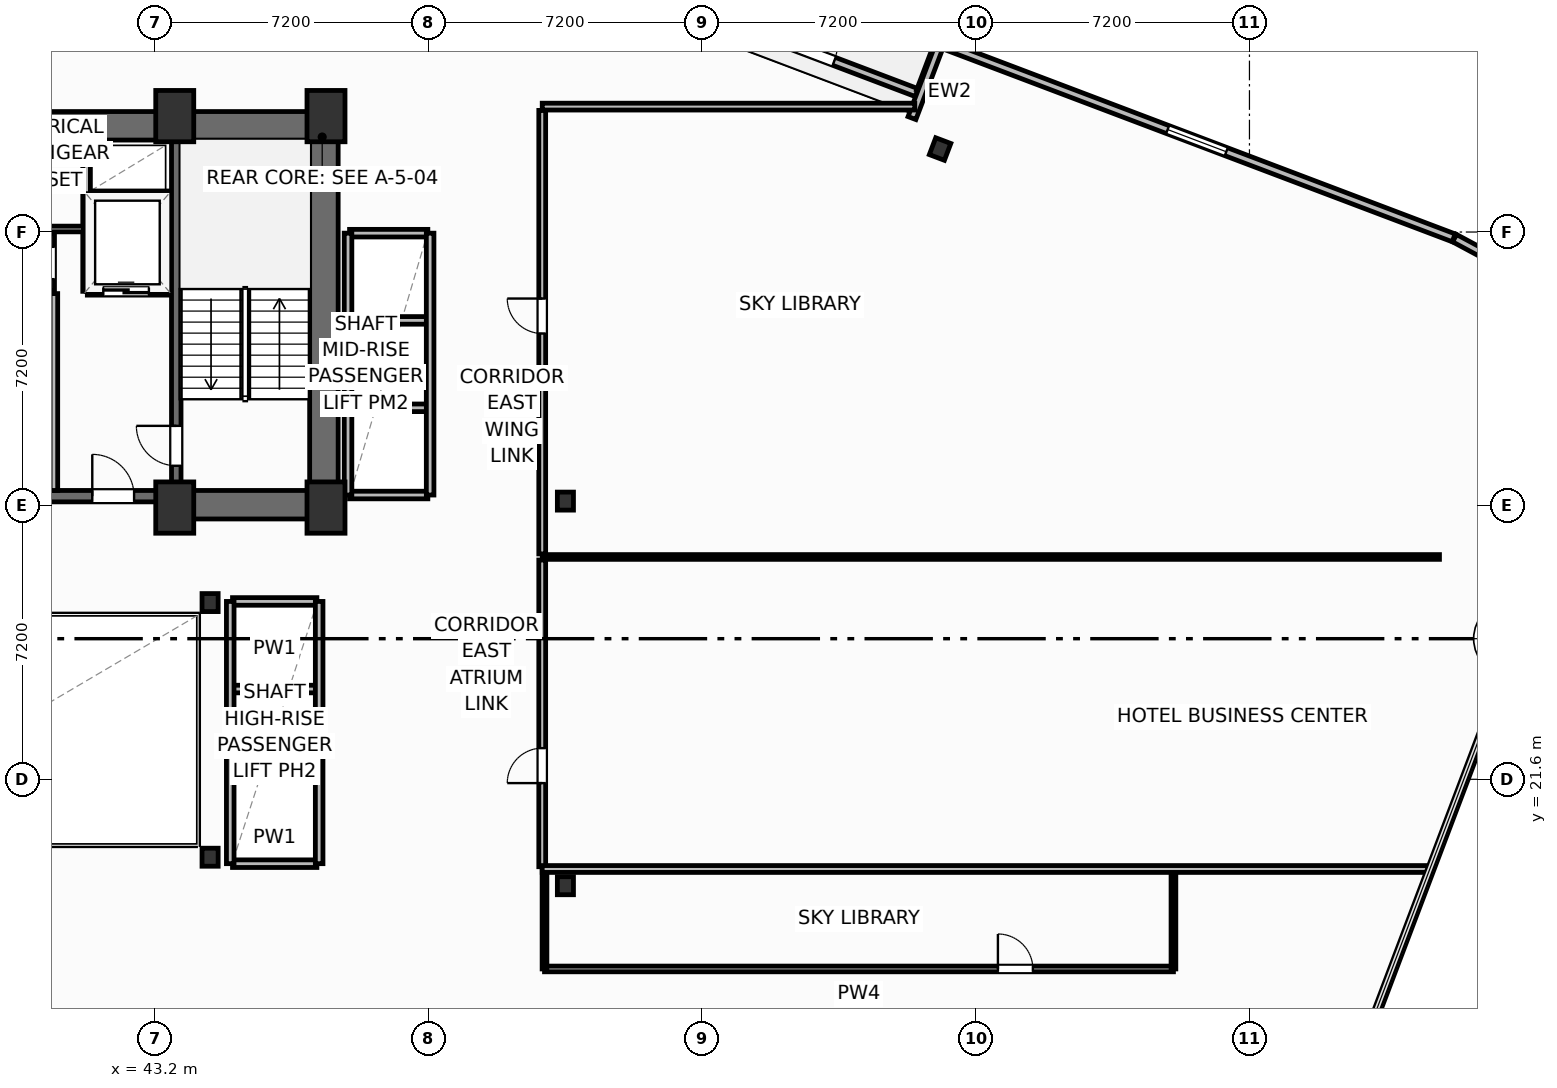
"""IFC4 building model, lengths in metres.
Left out: names, types, materials, properties, quantities, classifications, styles, units other than length and angle.
Written with IfcOpenShell. Run it as: python <this file> out.ifc"""

import sys

from ifc_helpers import new_model, si_unit, direction, frame, frame_2d, origin, origin_2d, place, context, subcontext, project, spatial, rectangle, i_section, extrude, element, fill, save


model = new_model("IFC4")
c1 = context("Model", 3, precision=1e-05, world=origin(), true_north=direction((0.0, 1.0)))
c2 = subcontext(c1, "Body", "Model", "MODEL_VIEW")
j1 = project(units=[si_unit("LENGTHUNIT", "METRE"), si_unit("PLANEANGLEUNIT", "RADIAN")], contexts=[c1])
p1 = place(None, origin())
s1 = spatial("IfcSite", under=j1, at=p1, CompositionType="ELEMENT")
p2 = place(p1, origin())
s2 = spatial("IfcBuilding", under=s1, at=p2, CompositionType="ELEMENT")
p3 = place(p2, frame((0.0, 0.0, 113.2)))
s3 = spatial("IfcBuildingStorey", under=s2, at=p3, CompositionType="ELEMENT", Elevation=113.2)
for number, where, z_axis, x_axis in (
    (1, (43.72, 28.75, 0.0), (0.0, 0.0, 1.0), (1.0, 0.0, 0.0)),
    (2, (47.7, 28.75, 0.0), (0.0, 0.0, 1.0), (1.0, 0.0, 0.0)),
    (3, (43.72, 39.05, 0.0), (0.0, 0.0, 1.0), (1.0, 0.0, 0.0)),
    (4, (47.7, 39.05, 0.0), (0.0, 0.0, 1.0), (1.0, 0.0, 0.0)),
):
    element("IfcColumn", number, at=place(p3, frame(where, z_axis=z_axis, x_axis=x_axis)), inside=s3, PredefinedType="COLUMN", context=c2, shape_type="SweptSolid", body=[
        extrude(rectangle(XDim=1.0, YDim=1.35, at=origin_2d()), origin(), (0.0, 0.0, 1.0), 3.7),
    ])
for number, where, z_axis, x_axis in (
    (5, (44.65, 19.55, 0.0), (0.0, 0.0, 1.0), (1.0, 0.0, 0.0)),
    (6, (44.65, 26.25, 0.0), (0.0, 0.0, 1.0), (1.0, 0.0, 0.0)),
    (7, (54.0, 18.8, 0.0), (0.0, 0.0, 1.0), (1.0, 0.0, 0.0)),
    (8, (54.0, 28.92, 0.0), (0.0, 0.0, 1.0), (1.0, 0.0, 0.0)),
):
    element("IfcColumn", number, at=place(p3, frame(where, z_axis=z_axis, x_axis=x_axis)), inside=s3, PredefinedType="COLUMN", context=c2, shape_type="SweptSolid", body=[
        extrude(i_section(OverallWidth=0.424, OverallDepth=0.474, WebThickness=0.048, FlangeThickness=0.077, FilletRadius=0.025, at=origin_2d()), origin(), (0.0, 0.0, 1.0), 3.7),
    ])
p4 = place(p3, frame((30.38, 38.795, 0.0), z_axis=(0.0, 0.0, 1.0), x_axis=(1.0, 0.0, 0.0)))
e9 = element("IfcWall", 9, at=p4, inside=s3, PredefinedType="SHEAR", context=c2, shape_type="SweptSolid", body=[
    extrude(rectangle(XDim=17.64, YDim=0.75, at=frame_2d((8.82, 0.0))), origin(), (0.0, 0.0, 1.0), 3.38),
])
p5 = place(p3, frame((47.645, 29.2, 0.0), z_axis=(0.0, 0.0, 1.0), x_axis=(0.0, 1.0, 0.0)))
e10 = element("IfcWall", 10, at=p5, inside=s3, PredefinedType="SHEAR", context=c2, shape_type="SweptSolid", body=[
    extrude(rectangle(XDim=9.22, YDim=0.75, at=frame_2d((4.61, 0.0))), origin(), (0.0, 0.0, 1.0), 3.38),
])
p6 = place(p3, frame((43.6, 28.825, 0.0), z_axis=(0.0, 0.0, 1.0), x_axis=(1.0, 0.0, 0.0)))
e11 = element("IfcWall", 11, at=p6, inside=s3, PredefinedType="SHEAR", context=c2, shape_type="SweptSolid", body=[
    extrude(rectangle(XDim=4.42, YDim=0.75, at=frame_2d((2.21, 0.0))), origin(), (0.0, 0.0, 1.0), 3.38),
])
p7 = place(p3, frame((34.8, 29.05, 0.0), z_axis=(0.0, 0.0, 1.0), x_axis=(1.0, 0.0, 0.0)))
e12 = element("IfcWall", 12, at=p7, inside=s3, PredefinedType="SHEAR", context=c2, shape_type="SweptSolid", body=[
    extrude(rectangle(XDim=8.8, YDim=0.3, at=frame_2d((4.4, 0.0))), origin(), (0.0, 0.0, 1.0), 3.38),
])
p8 = place(p7, frame((0.95, 0.0, 0.0)))
e13 = element("IfcOpeningElement", 13, at=p8, cuts=e12, PredefinedType="OPENING", context=c2, shape_type="SweptSolid", body=[
    extrude(rectangle(XDim=1.1, YDim=2.15, at=frame_2d((0.55, 1.075))), frame((0.0, 0.16, 0.0), z_axis=(0.0, -1.0, 0.0), x_axis=(1.0, 0.0, 0.0)), (0.0, 0.0, 1.0), 0.32),
])
p9 = place(p7, frame((6.75, 0.0, 0.0)))
e14 = element("IfcOpeningElement", 14, at=p9, cuts=e12, PredefinedType="OPENING", context=c2, shape_type="SweptSolid", body=[
    extrude(rectangle(XDim=1.1, YDim=2.15, at=frame_2d((0.55, 1.075))), frame((0.0, 0.16, 0.0), z_axis=(0.0, -1.0, 0.0), x_axis=(1.0, 0.0, 0.0)), (0.0, 0.0, 1.0), 0.32),
])
p10 = place(p7, frame((4.45, 0.0, 0.0)))
e15 = element("IfcOpeningElement", 15, at=p10, cuts=e12, PredefinedType="OPENING", context=c2, shape_type="SweptSolid", body=[
    extrude(rectangle(XDim=0.95, YDim=2.15, at=frame_2d((0.475, 1.075))), frame((0.0, 0.16, 0.0), z_axis=(0.0, -1.0, 0.0), x_axis=(1.0, 0.0, 0.0)), (0.0, 0.0, 1.0), 0.32),
])
p11 = place(p3, frame((43.76, 29.2, 0.0), z_axis=(0.0, 0.0, 1.0), x_axis=(0.0, 1.0, 0.0)))
e16 = element("IfcWall", 16, at=p11, inside=s3, PredefinedType="SHEAR", context=c2, shape_type="SweptSolid", body=[
    extrude(rectangle(XDim=9.22, YDim=0.25, at=frame_2d((4.61, 0.0))), origin(), (0.0, 0.0, 1.0), 3.38),
])
p12 = place(p11, frame((0.65, 0.0, 0.0)))
e17 = element("IfcOpeningElement", 17, at=p12, cuts=e16, PredefinedType="OPENING", context=c2, shape_type="SweptSolid", body=[
    extrude(rectangle(XDim=1.05, YDim=2.15, at=frame_2d((0.525, 1.075))), frame((0.0, 0.135, 0.0), z_axis=(0.0, -1.0, 0.0), x_axis=(1.0, 0.0, 0.0)), (0.0, 0.0, 1.0), 0.27),
])
p13 = place(p3, frame((63.859, 38.184, 0.0), z_axis=(0.0, 0.0, 1.0), x_axis=(0.935221751401, -0.354062530786, 0.0)))
e18 = element("IfcColumn", 18, at=p13, inside=s3, PredefinedType="COLUMN", context=c2, shape_type="SweptSolid", body=[
    extrude(i_section(OverallWidth=0.424, OverallDepth=0.474, WebThickness=0.048, FlangeThickness=0.077, FilletRadius=0.025, at=origin_2d()), origin(), (0.0, 0.0, 1.0), 3.7),
])
p14 = place(p3, frame((57.633, 41.792, 0.0), z_axis=(0.0, 0.0, 1.0), x_axis=(0.935222539288, -0.354060449652, 0.0)))
e19 = element("IfcWall", 19, at=p14, inside=s3, PredefinedType="SOLIDWALL", context=c2, shape_type="SweptSolid", body=[
    extrude(rectangle(XDim=6.0, YDim=0.22, at=frame_2d((3.0, 0.0))), origin(), (0.0, 0.0, 1.0), 2.66),
])
p15 = place(p14, frame((2.176, 0.0, 0.0)))
e20 = element("IfcOpeningElement", 20, at=p15, cuts=e19, PredefinedType="OPENING", context=c2, shape_type="SweptSolid", body=[
    extrude(rectangle(XDim=1.5, YDim=2.25, at=frame_2d((0.75, 1.125))), frame((0.0, 0.12, 0.0), z_axis=(0.0, -1.0, 0.0), x_axis=(1.0, 0.0, 0.0)), (0.0, 0.0, 1.0), 0.24),
])
p16 = place(p3, frame((78.597, 35.194, 0.0), z_axis=(0.0, 0.0, 1.0), x_axis=(-0.880948732004, 0.473211719614, 0.0)))
e21 = element("IfcWall", 21, at=p16, inside=s3, PredefinedType="SOLIDWALL", context=c2, shape_type="SweptSolid", body=[
    extrude(rectangle(XDim=1.361, YDim=0.22, at=frame_2d((0.681, 0.0))), origin(), (0.0, 0.0, 1.0), 2.66),
])
p17 = place(p3, frame((77.375, 35.847, 0.0), z_axis=(0.0, 0.0, 1.0), x_axis=(-0.935222448475, 0.354060689526, 0.0)))
e22 = element("IfcWall", 22, at=p17, inside=s3, PredefinedType="SOLIDWALL", context=c2, shape_type="SweptSolid", body=[
    extrude(rectangle(XDim=14.447, YDim=0.22, at=frame_2d((7.224, 0.0))), origin(), (0.0, 0.0, 1.0), 2.66),
])
p18 = place(p17, frame((6.399, 0.0, 0.8)))
e23 = element("IfcOpeningElement", 23, at=p18, cuts=e22, PredefinedType="OPENING", context=c2, shape_type="SweptSolid", body=[
    extrude(rectangle(XDim=1.65, YDim=1.65, at=frame_2d((0.825, 0.825))), frame((0.0, 0.12, 0.0), z_axis=(0.0, -1.0, 0.0), x_axis=(1.0, 0.0, 0.0)), (0.0, 0.0, 1.0), 0.24),
])
p19 = place(p3, frame((63.819, 40.845, 0.0), z_axis=(0.0, 0.0, 1.0), x_axis=(-0.354128791944, -0.935196663123, 0.0)))
e24 = element("IfcWall", 24, at=p19, inside=s3, PredefinedType="SOLIDWALL", context=c2, shape_type="SweptSolid", body=[
    extrude(rectangle(XDim=1.975, YDim=0.22, at=frame_2d((0.988, 0.0))), origin(), (0.0, 0.0, 1.0), 2.66),
])
p20 = place(p3, frame((53.45, 16.61, 0.0), z_axis=(0.0, 0.0, 1.0), x_axis=(1.0, 0.0, 0.0)))
e25 = element("IfcWall", 25, at=p20, inside=s3, PredefinedType="PARTITIONING", context=c2, shape_type="SweptSolid", body=[
    extrude(rectangle(XDim=16.55, YDim=0.15, at=frame_2d((8.275, 0.0))), origin(), (0.0, 0.0, 1.0), 3.38),
])
p21 = place(p20, frame((11.931, 0.0, 0.0)))
e26 = element("IfcOpeningElement", 26, at=p21, cuts=e25, PredefinedType="OPENING", context=c2, shape_type="SweptSolid", body=[
    extrude(rectangle(XDim=0.92, YDim=2.05, at=frame_2d((0.46, 1.025))), frame((0.0, 0.085, 0.0), z_axis=(0.0, -1.0, 0.0), x_axis=(1.0, 0.0, 0.0)), (0.0, 0.0, 1.0), 0.17),
])
p22 = place(p3, frame((53.45, 16.61, 0.0), z_axis=(0.0, 0.0, 1.0), x_axis=(0.0, 1.0, 0.0)))
e27 = element("IfcWall", 27, at=p22, inside=s3, PredefinedType="PARTITIONING", context=c2, shape_type="SweptSolid", body=[
    extrude(rectangle(XDim=2.63, YDim=0.125, at=frame_2d((1.315, 0.0))), origin(), (0.0, 0.0, 1.0), 1.165),
])
p23 = place(p3, frame((70.0, 16.61, 0.0), z_axis=(0.0, 0.0, 1.0), x_axis=(0.0, 1.0, 0.0)))
e28 = element("IfcWall", 28, at=p23, inside=s3, PredefinedType="PARTITIONING", context=c2, shape_type="SweptSolid", body=[
    extrude(rectangle(XDim=2.63, YDim=0.125, at=frame_2d((1.315, 0.0))), origin(), (0.0, 0.0, 1.0), 0.65),
])
p24 = place(p3, frame((53.39, 19.3, 0.0), z_axis=(0.0, 0.0, 1.0), x_axis=(0.0, 1.0, 0.0)))
e29 = element("IfcWall", 29, at=p24, inside=s3, PredefinedType="PARTITIONING", context=c2, shape_type="SweptSolid", body=[
    extrude(rectangle(XDim=8.07, YDim=0.18, at=frame_2d((4.035, 0.0))), origin(), (0.0, 0.0, 1.0), 3.38),
])
p25 = place(p24, frame((2.2, 0.0, 0.0)))
e30 = element("IfcOpeningElement", 30, at=p25, cuts=e29, PredefinedType="OPENING", context=c2, shape_type="SweptSolid", body=[
    extrude(rectangle(XDim=0.92, YDim=2.05, at=frame_2d((0.46, 1.025))), frame((0.0, 0.1, 0.0), z_axis=(0.0, -1.0, 0.0), x_axis=(1.0, 0.0, 0.0)), (0.0, 0.0, 1.0), 0.2),
])
p26 = place(p3, frame((53.39, 27.53, 0.0), z_axis=(0.0, 0.0, 1.0), x_axis=(0.0, 1.0, 0.0)))
e31 = element("IfcWall", 31, at=p26, inside=s3, PredefinedType="PARTITIONING", context=c2, shape_type="SweptSolid", body=[
    extrude(rectangle(XDim=11.67, YDim=0.18, at=frame_2d((5.835, 0.0))), origin(), (0.0, 0.0, 1.0), 3.38),
])
p27 = place(p26, frame((5.8, 0.0, 0.0)))
e32 = element("IfcOpeningElement", 32, at=p27, cuts=e31, PredefinedType="OPENING", context=c2, shape_type="SweptSolid", body=[
    extrude(rectangle(XDim=0.92, YDim=2.05, at=frame_2d((0.46, 1.025))), frame((0.0, 0.1, 0.0), z_axis=(0.0, -1.0, 0.0), x_axis=(1.0, 0.0, 0.0)), (0.0, 0.0, 1.0), 0.2),
])
p28 = place(p3, frame((53.39, 27.45, 0.0), z_axis=(0.0, 0.0, 1.0), x_axis=(1.0, 0.0, 0.0)))
e33 = element("IfcWall", 33, at=p28, inside=s3, PredefinedType="PARTITIONING", context=c2, shape_type="SweptSolid", body=[
    extrude(rectangle(XDim=23.61, YDim=0.125, at=frame_2d((11.805, 0.0))), origin(), (0.0, 0.0, 1.0), 3.38),
])
p29 = place(p3, frame((53.39, 19.24, 0.0), z_axis=(0.0, 0.0, 1.0), x_axis=(1.0, 0.0, 0.0)))
e34 = element("IfcWall", 34, at=p29, inside=s3, PredefinedType="PARTITIONING", context=c2, shape_type="SweptSolid", body=[
    extrude(rectangle(XDim=23.317, YDim=0.18, at=frame_2d((11.658, 0.0))), origin(), (0.0, 0.0, 1.0), 1.165),
])
p30 = place(p3, frame((53.39, 39.3, 0.0), z_axis=(0.0, 0.0, 1.0), x_axis=(1.0, 0.0, 0.0)))
e35 = element("IfcWall", 35, at=p30, inside=s3, PredefinedType="PARTITIONING", context=c2, shape_type="SweptSolid", body=[
    extrude(rectangle(XDim=9.804, YDim=0.18, at=frame_2d((4.902, 0.0))), origin(), (0.0, 0.0, 1.0), 3.38),
])
p31 = place(p3, frame((40.54, 29.2, 0.0), z_axis=(0.0, 0.0, 1.0), x_axis=(0.0, 1.0, 0.0)))
e36 = element("IfcWall", 36, at=p31, inside=s3, PredefinedType="PARTITIONING", context=c2, shape_type="SweptSolid", body=[
    extrude(rectangle(XDim=5.18, YDim=0.2, at=frame_2d((2.59, 0.0))), origin(), (0.0, 0.0, 1.0), 3.38),
])
p32 = place(p3, frame((41.42, 34.44, 0.0), z_axis=(0.0, 0.0, 1.0), x_axis=(1.0, 0.0, 0.0)))
e37 = element("IfcWall", 37, at=p32, inside=s3, PredefinedType="PARTITIONING", context=c2, shape_type="SweptSolid", body=[
    extrude(rectangle(XDim=2.18, YDim=0.2, at=frame_2d((1.09, 0.0))), origin(), (0.0, 0.0, 1.0), 3.38),
])
p33 = place(p32, frame((0.42, 0.0, 0.0)))
e38 = element("IfcOpeningElement", 38, at=p33, cuts=e37, PredefinedType="OPENING", context=c2, shape_type="SweptSolid", body=[
    extrude(rectangle(XDim=1.2, YDim=2.2, at=frame_2d((0.6, 1.1))), frame((0.0, 0.11, 0.0), z_axis=(0.0, -1.0, 0.0), x_axis=(1.0, 0.0, 0.0)), (0.0, 0.0, 1.0), 0.22),
])
p34 = place(p3, frame((41.42, 36.98, 0.0), z_axis=(0.0, 0.0, 1.0), x_axis=(1.0, 0.0, 0.0)))
e39 = element("IfcWall", 39, at=p34, inside=s3, PredefinedType="PARTITIONING", context=c2, shape_type="SweptSolid", body=[
    extrude(rectangle(XDim=2.18, YDim=0.2, at=frame_2d((1.09, 0.0))), origin(), (0.0, 0.0, 1.0), 3.38),
])
p35 = place(p3, frame((41.4, 34.44, 0.0), z_axis=(0.0, 0.0, 1.0), x_axis=(0.0, 1.0, 0.0)))
e40 = element("IfcWall", 40, at=p35, inside=s3, PredefinedType="PARTITIONING", context=c2, shape_type="SweptSolid", body=[
    extrude(rectangle(XDim=3.9, YDim=0.2, at=frame_2d((1.95, 0.0))), origin(), (0.0, 0.0, 1.0), 3.38),
])
p36 = place(p3, frame((39.3, 36.08, 0.0), z_axis=(0.0, 0.0, 1.0), x_axis=(1.0, 0.0, 0.0)))
e41 = element("IfcWall", 41, at=p36, inside=s3, PredefinedType="PARTITIONING", context=c2, shape_type="SweptSolid", body=[
    extrude(rectangle(XDim=2.02, YDim=0.15, at=frame_2d((1.01, 0.0))), origin(), (0.0, 0.0, 1.0), 3.38),
])
p37 = place(p36, frame((0.18, 0.0, 0.0)))
e42 = element("IfcOpeningElement", 42, at=p37, cuts=e41, PredefinedType="OPENING", context=c2, shape_type="SweptSolid", body=[
    extrude(rectangle(XDim=0.85, YDim=2.05, at=frame_2d((0.425, 1.025))), frame((0.0, 0.085, 0.0), z_axis=(0.0, -1.0, 0.0), x_axis=(1.0, 0.0, 0.0)), (0.0, 0.0, 1.0), 0.17),
])
p38 = place(p3, frame((40.48, 34.44, 0.0), z_axis=(0.0, 0.0, 1.0), x_axis=(0.0, 1.0, 0.0)))
e43 = element("IfcWall", 43, at=p38, inside=s3, PredefinedType="PARTITIONING", context=c2, shape_type="SweptSolid", body=[
    extrude(rectangle(XDim=1.52, YDim=0.15, at=frame_2d((0.76, 0.0))), origin(), (0.0, 0.0, 1.0), 3.38),
])
p39 = place(p38, frame((0.32, 0.0, 0.0)))
e44 = element("IfcOpeningElement", 44, at=p39, cuts=e43, PredefinedType="OPENING", context=c2, shape_type="SweptSolid", body=[
    extrude(rectangle(XDim=0.85, YDim=2.05, at=frame_2d((0.425, 1.025))), frame((0.0, 0.085, 0.0), z_axis=(0.0, -1.0, 0.0), x_axis=(1.0, 0.0, 0.0)), (0.0, 0.0, 1.0), 0.17),
])
for number, where, z_axis, x_axis in (
    (45, (48.32, 31.375, 0.0), (0.0, 0.0, 1.0), (1.0, 0.0, 0.0)),
    (46, (48.32, 33.675, 0.0), (0.0, 0.0, 1.0), (1.0, 0.0, 0.0)),
):
    element("IfcWall", number, at=place(p3, frame(where, z_axis=z_axis, x_axis=x_axis)), inside=s3, PredefinedType="PARTITIONING", context=c2, shape_type="SweptSolid", body=[
        extrude(rectangle(XDim=2.06, YDim=0.2, at=frame_2d((1.03, 0.0))), origin(), (0.0, 0.0, 1.0), 3.38),
    ])
p40 = place(p3, frame((48.32, 29.08, 0.0), z_axis=(0.0, 0.0, 1.0), x_axis=(1.0, 0.0, 0.0)))
e47 = element("IfcWall", 47, at=p40, inside=s3, PredefinedType="PARTITIONING", context=c2, shape_type="SweptSolid", body=[
    extrude(rectangle(XDim=2.06, YDim=0.2, at=frame_2d((1.03, 0.0))), origin(), (0.0, 0.0, 1.0), 2.592),
])
p41 = place(p3, frame((48.32, 35.97, 0.0), z_axis=(0.0, 0.0, 1.0), x_axis=(1.0, 0.0, 0.0)))
e48 = element("IfcWall", 48, at=p41, inside=s3, PredefinedType="PARTITIONING", context=c2, shape_type="SweptSolid", body=[
    extrude(rectangle(XDim=2.06, YDim=0.2, at=frame_2d((1.03, 0.0))), origin(), (0.0, 0.0, 1.0), 3.38),
])
for number, where, z_axis, x_axis in (
    (49, (48.28, 29.08, 0.0), (0.0, 0.0, 1.0), (0.0, 1.0, 0.0)),
    (50, (50.44, 29.08, 0.0), (0.0, 0.0, 1.0), (0.0, 1.0, 0.0)),
):
    element("IfcWall", number, at=place(p3, frame(where, z_axis=z_axis, x_axis=x_axis)), inside=s3, PredefinedType="PARTITIONING", context=c2, shape_type="SweptSolid", body=[
        extrude(rectangle(XDim=6.89, YDim=0.2, at=frame_2d((3.445, 0.0))), origin(), (0.0, 0.0, 1.0), 3.38),
    ])
for number, where, z_axis, x_axis in (
    (51, (45.24, 21.675, 0.0), (0.0, 0.0, 1.0), (1.0, 0.0, 0.0)),
    (52, (45.24, 23.975, 0.0), (0.0, 0.0, 1.0), (1.0, 0.0, 0.0)),
):
    element("IfcWall", number, at=place(p3, frame(where, z_axis=z_axis, x_axis=x_axis)), inside=s3, PredefinedType="PARTITIONING", context=c2, shape_type="SweptSolid", body=[
        extrude(rectangle(XDim=2.22, YDim=0.2, at=frame_2d((1.11, 0.0))), origin(), (0.0, 0.0, 1.0), 3.38),
    ])
p42 = place(p3, frame((45.24, 19.38, 0.0), z_axis=(0.0, 0.0, 1.0), x_axis=(1.0, 0.0, 0.0)))
e53 = element("IfcWall", 53, at=p42, inside=s3, PredefinedType="PARTITIONING", context=c2, shape_type="SweptSolid", body=[
    extrude(rectangle(XDim=2.22, YDim=0.2, at=frame_2d((1.11, 0.0))), origin(), (0.0, 0.0, 1.0), 2.592),
])
p43 = place(p3, frame((45.24, 26.28, 0.0), z_axis=(0.0, 0.0, 1.0), x_axis=(1.0, 0.0, 0.0)))
e54 = element("IfcWall", 54, at=p43, inside=s3, PredefinedType="PARTITIONING", context=c2, shape_type="SweptSolid", body=[
    extrude(rectangle(XDim=2.22, YDim=0.2, at=frame_2d((1.11, 0.0))), origin(), (0.0, 0.0, 1.0), 3.38),
])
for number, where, z_axis, x_axis in (
    (55, (45.18, 19.38, 0.0), (0.0, 0.0, 1.0), (0.0, 1.0, 0.0)),
    (56, (47.52, 19.38, 0.0), (0.0, 0.0, 1.0), (0.0, 1.0, 0.0)),
):
    element("IfcWall", number, at=place(p3, frame(where, z_axis=z_axis, x_axis=x_axis)), inside=s3, PredefinedType="PARTITIONING", context=c2, shape_type="SweptSolid", body=[
        extrude(rectangle(XDim=6.9, YDim=0.2, at=frame_2d((3.45, 0.0))), origin(), (0.0, 0.0, 1.0), 3.38),
    ])
p44 = place(p15, origin())
e57 = element("IfcDoor", 57, at=p44, inside=s3, OperationType="SINGLE_SWING_LEFT", PredefinedType="DOOR", context=c2, shape_type="SweptSolid", body=[
    extrude(rectangle(XDim=1.5, YDim=2.25, at=frame_2d((0.75, 1.125))), frame((0.0, 0.025, 0.0), z_axis=(0.0, -1.0, 0.0), x_axis=(1.0, 0.0, 0.0)), (0.0, 0.0, 1.0), 0.05),
])
fill(e20, e57)
p45 = place(p18, origin())
e58 = element("IfcWindow", 58, at=p45, inside=s3, PartitioningType="SINGLE_PANEL", PredefinedType="WINDOW", context=c2, shape_type="SweptSolid", body=[
    extrude(rectangle(XDim=1.65, YDim=1.65, at=frame_2d((0.825, 0.825))), frame((0.0, 0.03, 0.0), z_axis=(0.0, -1.0, 0.0), x_axis=(1.0, 0.0, 0.0)), (0.0, 0.0, 1.0), 0.06),
])
fill(e23, e58)
p46 = place(p21, origin())
e59 = element("IfcDoor", 59, at=p46, inside=s3, OperationType="SINGLE_SWING_LEFT", PredefinedType="DOOR", context=c2, shape_type="SweptSolid", body=[
    extrude(rectangle(XDim=0.92, YDim=2.05, at=frame_2d((0.46, 1.025))), frame((0.0, 0.025, 0.0), z_axis=(0.0, -1.0, 0.0), x_axis=(1.0, 0.0, 0.0)), (0.0, 0.0, 1.0), 0.05),
])
fill(e26, e59)
p47 = place(p25, origin())
e60 = element("IfcDoor", 60, at=p47, inside=s3, OperationType="SINGLE_SWING_LEFT", PredefinedType="DOOR", context=c2, shape_type="SweptSolid", body=[
    extrude(rectangle(XDim=0.92, YDim=2.05, at=frame_2d((0.46, 1.025))), frame((0.0, 0.025, 0.0), z_axis=(0.0, -1.0, 0.0), x_axis=(1.0, 0.0, 0.0)), (0.0, 0.0, 1.0), 0.05),
])
fill(e30, e60)
p48 = place(p27, origin())
e61 = element("IfcDoor", 61, at=p48, inside=s3, OperationType="SINGLE_SWING_RIGHT", PredefinedType="DOOR", context=c2, shape_type="SweptSolid", body=[
    extrude(rectangle(XDim=0.92, YDim=2.05, at=frame_2d((0.46, 1.025))), frame((0.0, 0.025, 0.0), z_axis=(0.0, -1.0, 0.0), x_axis=(1.0, 0.0, 0.0)), (0.0, 0.0, 1.0), 0.05),
])
fill(e32, e61)
p49 = place(p12, origin())
e62 = element("IfcDoor", 62, at=p49, inside=s3, OperationType="SINGLE_SWING_RIGHT", PredefinedType="DOOR", context=c2, shape_type="SweptSolid", body=[
    extrude(rectangle(XDim=1.05, YDim=2.15, at=frame_2d((0.525, 1.075))), frame((0.0, 0.025, 0.0), z_axis=(0.0, -1.0, 0.0), x_axis=(1.0, 0.0, 0.0)), (0.0, 0.0, 1.0), 0.05),
])
fill(e17, e62)
p50 = place(p9, origin())
e63 = element("IfcDoor", 63, at=p50, inside=s3, OperationType="SINGLE_SWING_LEFT", PredefinedType="DOOR", context=c2, shape_type="SweptSolid", body=[
    extrude(rectangle(XDim=1.1, YDim=2.15, at=frame_2d((0.55, 1.075))), frame((0.0, 0.025, 0.0), z_axis=(0.0, -1.0, 0.0), x_axis=(1.0, 0.0, 0.0)), (0.0, 0.0, 1.0), 0.05),
])
fill(e14, e63)
p51 = place(p33, origin())
e64 = element("IfcDoor", 64, at=p51, inside=s3, OperationType="SLIDING_TO_LEFT", PredefinedType="DOOR", context=c2, shape_type="SweptSolid", body=[
    extrude(rectangle(XDim=1.2, YDim=2.2, at=frame_2d((0.6, 1.1))), frame((0.0, 0.025, 0.0), z_axis=(0.0, -1.0, 0.0), x_axis=(1.0, 0.0, 0.0)), (0.0, 0.0, 1.0), 0.05),
])
fill(e38, e64)
p52 = place(p39, origin())
e65 = element("IfcDoor", 65, at=p52, inside=s3, OperationType="SINGLE_SWING_LEFT", PredefinedType="DOOR", context=c2, shape_type="SweptSolid", body=[
    extrude(rectangle(XDim=0.85, YDim=2.05, at=frame_2d((0.425, 1.025))), frame((0.0, 0.025, 0.0), z_axis=(0.0, -1.0, 0.0), x_axis=(1.0, 0.0, 0.0)), (0.0, 0.0, 1.0), 0.05),
])
fill(e44, e65)
save(model, sys.argv[1])
